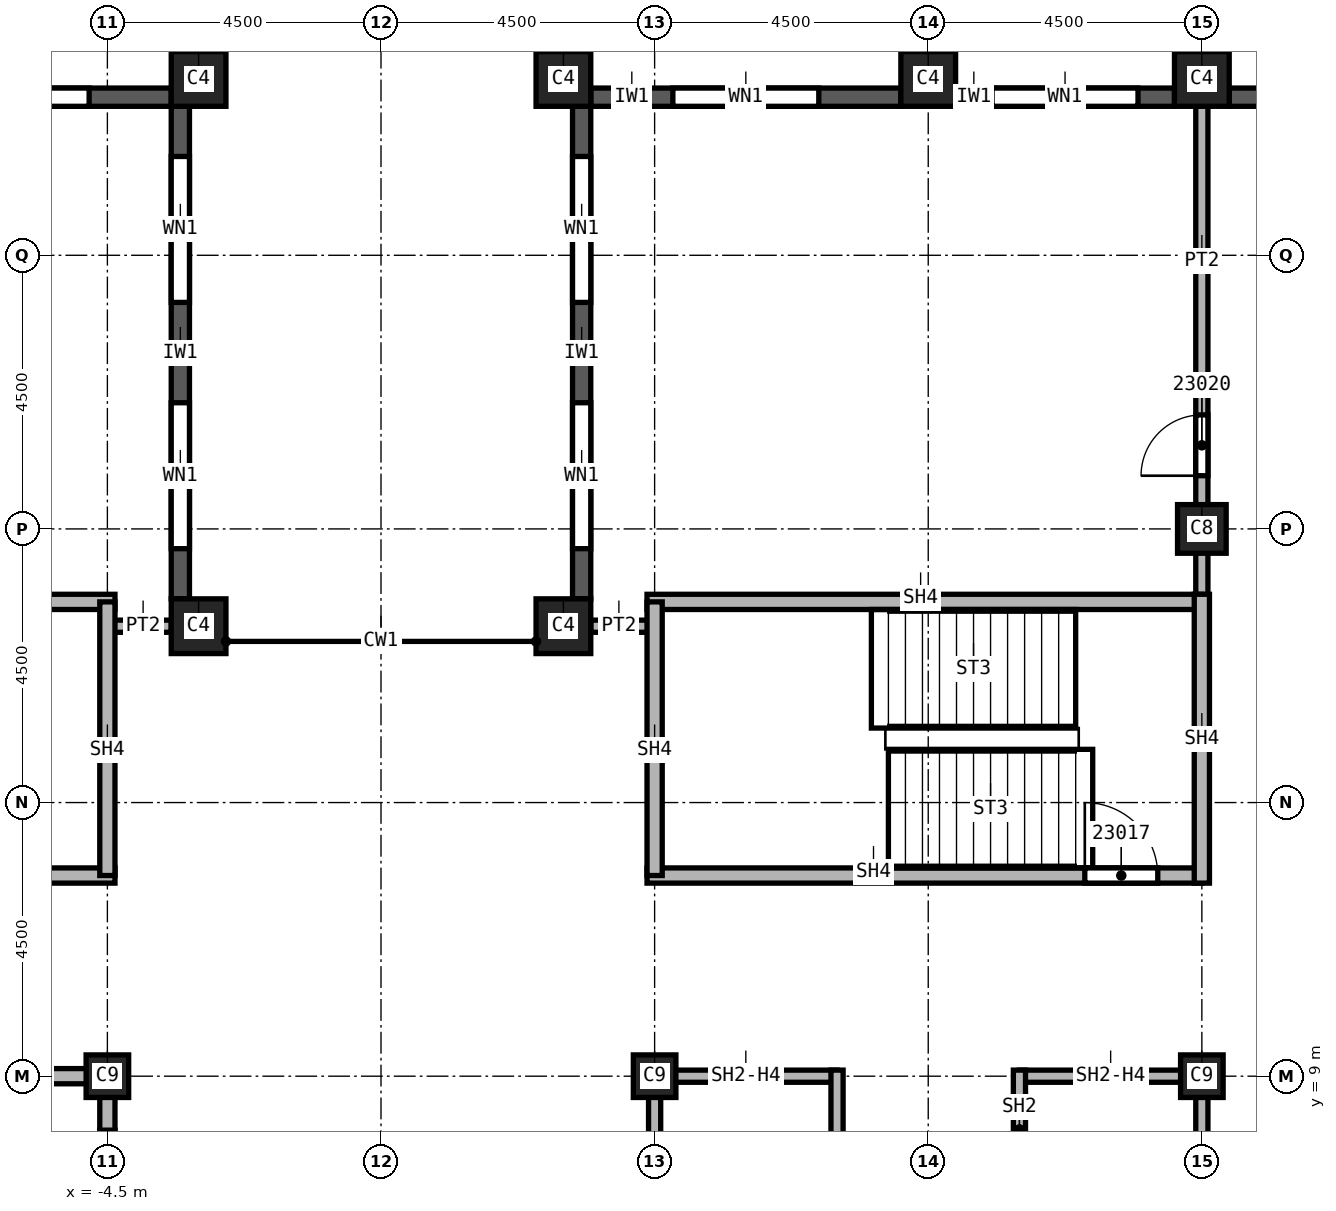
"""IFC4 building model, lengths in metres.
Left out: names, types, materials, properties, quantities, classifications, styles, units other than length and angle.
Written with IfcOpenShell. Run it as: python <this file> out.ifc"""

import sys

from ifc_helpers import new_model, si_unit, direction, frame, frame_2d, origin, origin_2d, place, context, subcontext, project, spatial, rectangle, extrude, element, fill, save


model = new_model("IFC4")
c1 = context("Model", 3, precision=1e-05, world=origin(), true_north=direction((0.0, 1.0)))
c2 = subcontext(c1, "Body", "Model", "MODEL_VIEW")
j1 = project(units=[si_unit("LENGTHUNIT", "METRE"), si_unit("PLANEANGLEUNIT", "RADIAN")], contexts=[c1])
p1 = place(None, origin())
s1 = spatial("IfcSite", under=j1, at=p1, CompositionType="ELEMENT")
p2 = place(p1, origin())
s2 = spatial("IfcBuilding", under=s1, at=p2, CompositionType="ELEMENT")
p3 = place(p2, frame((0.0, 0.0, 330.0)))
s3 = spatial("IfcBuildingStorey", under=s2, at=p3, CompositionType="ELEMENT", Elevation=330.0)
p4 = place(p3, frame((13.5, 18.0, 0.0), z_axis=(0.0, 0.0, 1.0), x_axis=(1.0, 0.0, 0.0)))
e1 = element("IfcColumn", 1, at=p4, inside=s3, PredefinedType="COLUMN", context=c2, shape_type="SweptSolid", body=[
    extrude(rectangle(XDim=0.8, YDim=0.8, at=origin_2d()), origin(), (0.0, 0.0, 1.0), 3.74),
])
for number, where, z_axis, x_axis in (
    (2, (4.5, 9.0, 0.0), (0.0, 0.0, 1.0), (1.0, 0.0, 0.0)),
    (3, (13.5, 9.0, 0.0), (0.0, 0.0, 1.0), (1.0, 0.0, 0.0)),
    (4, (-4.5, 9.0, 0.0), (0.0, 0.0, 1.0), (1.0, 0.0, 0.0)),
):
    element("IfcColumn", number, at=place(p3, frame(where, z_axis=z_axis, x_axis=x_axis)), inside=s3, PredefinedType="COLUMN", context=c2, shape_type="SweptSolid", body=[
        extrude(rectangle(XDim=0.7, YDim=0.7, at=origin_2d()), origin(), (0.0, 0.0, 1.0), 3.74),
    ])
for number, where, z_axis, x_axis in (
    (5, (3.0, 25.4, 0.0), (0.0, 0.0, 1.0), (1.0, 0.0, 0.0)),
    (6, (9.0, 25.4, 0.0), (0.0, 0.0, 1.0), (1.0, 0.0, 0.0)),
    (7, (13.5, 25.4, 0.0), (0.0, 0.0, 1.0), (1.0, 0.0, 0.0)),
    (8, (-3.0, 25.4, 0.0), (0.0, 0.0, 1.0), (1.0, 0.0, 0.0)),
    (9, (3.0, 16.4, 0.0), (0.0, 0.0, 1.0), (1.0, 0.0, 0.0)),
    (10, (-3.0, 16.4, 0.0), (0.0, 0.0, 1.0), (1.0, 0.0, 0.0)),
):
    element("IfcColumn", number, at=place(p3, frame(where, z_axis=z_axis, x_axis=x_axis)), inside=s3, PredefinedType="COLUMN", context=c2, shape_type="SweptSolid", body=[
        extrude(rectangle(XDim=0.9, YDim=0.9, at=origin_2d()), origin(), (0.0, 0.0, 1.0), 3.74),
    ])
p5 = place(p3, frame((17.55, 25.1, 0.0), z_axis=(0.0, 0.0, 1.0), x_axis=(-1.0, 0.0, 0.0)))
e11 = element("IfcWall", 11, at=p5, inside=s3, PredefinedType="SOLIDWALL", context=c2, shape_type="SweptSolid", body=[
    extrude(rectangle(XDim=3.6, YDim=0.3, at=frame_2d((1.8, 0.0))), origin(), (0.0, 0.0, 1.0), 3.14),
])
p6 = place(p5, frame((0.775, 0.0, 0.8)))
e12 = element("IfcOpeningElement", 12, at=p6, cuts=e11, PredefinedType="OPENING", context=c2, shape_type="SweptSolid", body=[
    extrude(rectangle(XDim=1.0, YDim=1.95, at=frame_2d((0.5, 0.975))), frame((0.0, 0.15, 0.0), z_axis=(0.0, -1.0, 0.0), x_axis=(1.0, 0.0, 0.0)), (0.0, 0.0, 1.0), 0.3),
])
p7 = place(p5, frame((2.375, 0.0, 0.8)))
e13 = element("IfcOpeningElement", 13, at=p7, cuts=e11, PredefinedType="OPENING", context=c2, shape_type="SweptSolid", body=[
    extrude(rectangle(XDim=0.6, YDim=1.95, at=frame_2d((0.3, 0.975))), frame((0.0, 0.15, 0.0), z_axis=(0.0, -1.0, 0.0), x_axis=(1.0, 0.0, 0.0)), (0.0, 0.0, 1.0), 0.3),
])
p8 = place(p3, frame((13.05, 25.1, 0.0), z_axis=(0.0, 0.0, 1.0), x_axis=(-1.0, 0.0, 0.0)))
e14 = element("IfcWall", 14, at=p8, inside=s3, PredefinedType="SOLIDWALL", context=c2, shape_type="SweptSolid", body=[
    extrude(rectangle(XDim=3.6, YDim=0.3, at=frame_2d((1.8, 0.0))), origin(), (0.0, 0.0, 1.0), 3.14),
])
p9 = place(p8, frame((0.6, 0.0, 0.8)))
e15 = element("IfcOpeningElement", 15, at=p9, cuts=e14, PredefinedType="OPENING", context=c2, shape_type="SweptSolid", body=[
    extrude(rectangle(XDim=2.4, YDim=1.95, at=frame_2d((1.2, 0.975))), frame((0.0, 0.15, 0.0), z_axis=(0.0, -1.0, 0.0), x_axis=(1.0, 0.0, 0.0)), (0.0, 0.0, 1.0), 0.3),
])
p10 = place(p3, frame((8.55, 25.1, 0.0), z_axis=(0.0, 0.0, 1.0), x_axis=(-1.0, 0.0, 0.0)))
e16 = element("IfcWall", 16, at=p10, inside=s3, PredefinedType="SOLIDWALL", context=c2, shape_type="SweptSolid", body=[
    extrude(rectangle(XDim=5.1, YDim=0.3, at=frame_2d((2.55, 0.0))), origin(), (0.0, 0.0, 1.0), 3.14),
])
p11 = place(p10, frame((1.35, 0.0, 0.8)))
e17 = element("IfcOpeningElement", 17, at=p11, cuts=e16, PredefinedType="OPENING", context=c2, shape_type="SweptSolid", body=[
    extrude(rectangle(XDim=2.4, YDim=1.95, at=frame_2d((1.2, 0.975))), frame((0.0, 0.15, 0.0), z_axis=(0.0, -1.0, 0.0), x_axis=(1.0, 0.0, 0.0)), (0.0, 0.0, 1.0), 0.3),
])
p12 = place(p3, frame((3.3, 24.95, 0.0), z_axis=(0.0, 0.0, 1.0), x_axis=(0.0, -1.0, 0.0)))
e18 = element("IfcWall", 18, at=p12, inside=s3, PredefinedType="SOLIDWALL", context=c2, shape_type="SweptSolid", body=[
    extrude(rectangle(XDim=8.1, YDim=0.3, at=frame_2d((4.05, 0.0))), origin(), (0.0, 0.0, 1.0), 3.14),
])
p13 = place(p12, frame((0.825, 0.0, 0.8)))
e19 = element("IfcOpeningElement", 19, at=p13, cuts=e18, PredefinedType="OPENING", context=c2, shape_type="SweptSolid", body=[
    extrude(rectangle(XDim=2.4, YDim=1.95, at=frame_2d((1.2, 0.975))), frame((0.0, 0.15, 0.0), z_axis=(0.0, -1.0, 0.0), x_axis=(1.0, 0.0, 0.0)), (0.0, 0.0, 1.0), 0.3),
])
p14 = place(p12, frame((4.875, 0.0, 0.8)))
e20 = element("IfcOpeningElement", 20, at=p14, cuts=e18, PredefinedType="OPENING", context=c2, shape_type="SweptSolid", body=[
    extrude(rectangle(XDim=2.4, YDim=1.95, at=frame_2d((1.2, 0.975))), frame((0.0, 0.15, 0.0), z_axis=(0.0, -1.0, 0.0), x_axis=(1.0, 0.0, 0.0)), (0.0, 0.0, 1.0), 0.3),
])
p15 = place(p3, frame((-3.3, 16.85, 0.0), z_axis=(0.0, 0.0, 1.0), x_axis=(0.0, 1.0, 0.0)))
e21 = element("IfcWall", 21, at=p15, inside=s3, PredefinedType="SOLIDWALL", context=c2, shape_type="SweptSolid", body=[
    extrude(rectangle(XDim=8.1, YDim=0.3, at=frame_2d((4.05, 0.0))), origin(), (0.0, 0.0, 1.0), 3.14),
])
p16 = place(p15, frame((0.825, 0.0, 0.8)))
e22 = element("IfcOpeningElement", 22, at=p16, cuts=e21, PredefinedType="OPENING", context=c2, shape_type="SweptSolid", body=[
    extrude(rectangle(XDim=2.4, YDim=1.95, at=frame_2d((1.2, 0.975))), frame((0.0, 0.15, 0.0), z_axis=(0.0, -1.0, 0.0), x_axis=(1.0, 0.0, 0.0)), (0.0, 0.0, 1.0), 0.3),
])
p17 = place(p15, frame((4.875, 0.0, 0.8)))
e23 = element("IfcOpeningElement", 23, at=p17, cuts=e21, PredefinedType="OPENING", context=c2, shape_type="SweptSolid", body=[
    extrude(rectangle(XDim=2.4, YDim=1.95, at=frame_2d((1.2, 0.975))), frame((0.0, 0.15, 0.0), z_axis=(0.0, -1.0, 0.0), x_axis=(1.0, 0.0, 0.0)), (0.0, 0.0, 1.0), 0.3),
])
p18 = place(p3, frame((-3.45, 25.1, 0.0), z_axis=(0.0, 0.0, 1.0), x_axis=(-1.0, 0.0, 0.0)))
e24 = element("IfcWall", 24, at=p18, inside=s3, PredefinedType="SOLIDWALL", context=c2, shape_type="SweptSolid", body=[
    extrude(rectangle(XDim=5.1, YDim=0.3, at=frame_2d((2.55, 0.0))), origin(), (0.0, 0.0, 1.0), 3.14),
])
p19 = place(p18, frame((1.35, 0.0, 0.8)))
e25 = element("IfcOpeningElement", 25, at=p19, cuts=e24, PredefinedType="OPENING", context=c2, shape_type="SweptSolid", body=[
    extrude(rectangle(XDim=2.4, YDim=1.95, at=frame_2d((1.2, 0.975))), frame((0.0, 0.15, 0.0), z_axis=(0.0, -1.0, 0.0), x_axis=(1.0, 0.0, 0.0)), (0.0, 0.0, 1.0), 0.3),
])
for number, where, z_axis, x_axis in (
    (26, (-4.5, 16.4, 0.0), (0.0, 0.0, 1.0), (1.0, 0.0, 0.0)),
    (27, (3.45, 16.4, 0.0), (0.0, 0.0, 1.0), (1.0, 0.0, 0.0)),
):
    element("IfcWall", number, at=place(p3, frame(where, z_axis=z_axis, x_axis=x_axis)), inside=s3, PredefinedType="PARTITIONING", context=c2, shape_type="SweptSolid", body=[
        extrude(rectangle(XDim=1.05, YDim=0.2, at=frame_2d((0.525, 0.0))), origin(), (0.0, 0.0, 1.0), 3.74),
    ])
p20 = place(p3, frame((13.5, 16.675, 0.0), z_axis=(0.0, 0.0, 1.0), x_axis=(0.0, 1.0, 0.0)))
e28 = element("IfcWall", 28, at=p20, inside=s3, PredefinedType="PARTITIONING", context=c2, shape_type="SweptSolid", body=[
    extrude(rectangle(XDim=8.275, YDim=0.2, at=frame_2d((4.137, 0.0))), origin(), (0.0, 0.0, 1.0), 3.74),
])
p21 = place(p20, frame((2.2, 0.0, 0.0)))
e29 = element("IfcOpeningElement", 29, at=p21, cuts=e28, PredefinedType="OPENING", context=c2, shape_type="SweptSolid", body=[
    extrude(rectangle(XDim=1.0, YDim=2.1, at=frame_2d((0.5, 1.05))), frame((0.0, 0.1, 0.0), z_axis=(0.0, -1.0, 0.0), x_axis=(1.0, 0.0, 0.0)), (0.0, 0.0, 1.0), 0.2),
])
p22 = place(p3, frame((4.5, -6.0, 0.0), z_axis=(0.0, 0.0, 1.0), x_axis=(0.0, 1.0, 0.0)))
e30 = element("IfcWall", 30, at=p22, inside=s3, PredefinedType="SOLIDWALL", context=c2, shape_type="SweptSolid", body=[
    extrude(rectangle(XDim=15.1, YDim=0.2, at=frame_2d((7.55, 0.0))), origin(), (0.0, 0.0, 1.0), 3.062),
])
p23 = place(p22, frame((0.25, 0.0, 0.0)))
e31 = element("IfcOpeningElement", 31, at=p23, cuts=e30, PredefinedType="OPENING", context=c2, shape_type="SweptSolid", body=[
    extrude(rectangle(XDim=1.1, YDim=2.1, at=frame_2d((0.55, 1.05))), frame((0.0, 0.1, 0.0), z_axis=(0.0, -1.0, 0.0), x_axis=(1.0, 0.0, 0.0)), (0.0, 0.0, 1.0), 0.2),
])
p24 = place(p22, frame((6.85, 0.0, 0.0)))
e32 = element("IfcOpeningElement", 32, at=p24, cuts=e30, PredefinedType="OPENING", context=c2, shape_type="SweptSolid", body=[
    extrude(rectangle(XDim=1.1, YDim=2.1, at=frame_2d((0.55, 1.05))), frame((0.0, 0.1, 0.0), z_axis=(0.0, -1.0, 0.0), x_axis=(1.0, 0.0, 0.0)), (0.0, 0.0, 1.0), 0.2),
])
p25 = place(p3, frame((4.5, 9.0, 0.0), z_axis=(0.0, 0.0, 1.0), x_axis=(1.0, 0.0, 0.0)))
e33 = element("IfcWall", 33, at=p25, inside=s3, PredefinedType="SOLIDWALL", context=c2, shape_type="SweptSolid", body=[
    extrude(rectangle(XDim=3.0, YDim=0.2, at=frame_2d((1.5, 0.0))), origin(), (0.0, 0.0, 1.0), 3.062),
])
p26 = place(p3, frame((7.5, 9.1, 0.0), z_axis=(0.0, 0.0, 1.0), x_axis=(0.0, -1.0, 0.0)))
e34 = element("IfcWall", 34, at=p26, inside=s3, PredefinedType="SOLIDWALL", context=c2, shape_type="SweptSolid", body=[
    extrude(rectangle(XDim=6.225, YDim=0.2, at=frame_2d((3.113, 0.0))), origin(), (0.0, 0.0, 1.0), 3.74),
])
p27 = place(p3, frame((10.5, 9.0, 0.0), z_axis=(0.0, 0.0, 1.0), x_axis=(1.0, 0.0, 0.0)))
e35 = element("IfcWall", 35, at=p27, inside=s3, PredefinedType="SOLIDWALL", context=c2, shape_type="SweptSolid", body=[
    extrude(rectangle(XDim=3.0, YDim=0.2, at=frame_2d((1.5, 0.0))), origin(), (0.0, 0.0, 1.0), 3.062),
])
p28 = place(p3, frame((10.5, 9.1, 0.0), z_axis=(0.0, 0.0, 1.0), x_axis=(0.0, -1.0, 0.0)))
e36 = element("IfcWall", 36, at=p28, inside=s3, PredefinedType="SOLIDWALL", context=c2, shape_type="SweptSolid", body=[
    extrude(rectangle(XDim=3.225, YDim=0.2, at=frame_2d((1.613, 0.0))), origin(), (0.0, 0.0, 1.0), 3.74),
])
p29 = place(p28, frame((1.75, 0.0, 0.0)))
e37 = element("IfcOpeningElement", 37, at=p29, cuts=e36, PredefinedType="OPENING", context=c2, shape_type="SweptSolid", body=[
    extrude(rectangle(XDim=1.1, YDim=2.1, at=frame_2d((0.55, 1.05))), frame((0.0, 0.1, 0.0), z_axis=(0.0, -1.0, 0.0), x_axis=(1.0, 0.0, 0.0)), (0.0, 0.0, 1.0), 0.2),
])
p30 = place(p3, frame((13.5, 9.1, 0.0), z_axis=(0.0, 0.0, 1.0), x_axis=(0.0, -1.0, 0.0)))
e38 = element("IfcWall", 38, at=p30, inside=s3, PredefinedType="SOLIDWALL", context=c2, shape_type="SweptSolid", body=[
    extrude(rectangle(XDim=3.1, YDim=0.2, at=frame_2d((1.55, 0.0))), origin(), (0.0, 0.0, 1.0), 3.062),
])
p31 = place(p3, frame((-7.5, 9.0, 0.0), z_axis=(0.0, 0.0, 1.0), x_axis=(1.0, 0.0, 0.0)))
e39 = element("IfcWall", 39, at=p31, inside=s3, PredefinedType="SOLIDWALL", context=c2, shape_type="SweptSolid", body=[
    extrude(rectangle(XDim=3.0, YDim=0.25, at=frame_2d((1.5, 0.0))), origin(), (0.0, 0.0, 1.0), 3.062),
])
p32 = place(p3, frame((-4.5, 9.125, 0.0), z_axis=(0.0, 0.0, 1.0), x_axis=(0.0, -1.0, 0.0)))
e40 = element("IfcWall", 40, at=p32, inside=s3, PredefinedType="SOLIDWALL", context=c2, shape_type="SweptSolid", body=[
    extrude(rectangle(XDim=3.125, YDim=0.25, at=frame_2d((1.562, 0.0))), origin(), (0.0, 0.0, 1.0), 3.062),
])
p33 = place(p32, frame((1.012, 0.0, 0.0)))
e41 = element("IfcOpeningElement", 41, at=p33, cuts=e40, PredefinedType="OPENING", context=c2, shape_type="SweptSolid", body=[
    extrude(rectangle(XDim=1.1, YDim=2.1, at=frame_2d((0.55, 1.05))), frame((0.0, 0.125, 0.0), z_axis=(0.0, -1.0, 0.0), x_axis=(1.0, 0.0, 0.0)), (0.0, 0.0, 1.0), 0.25),
])
p34 = place(p3, frame((-13.5, 12.3, 0.0), z_axis=(0.0, 0.0, 1.0), x_axis=(1.0, 0.0, 0.0)))
e42 = element("IfcWall", 42, at=p34, inside=s3, PredefinedType="SOLIDWALL", context=c2, shape_type="SweptSolid", body=[
    extrude(rectangle(XDim=9.125, YDim=0.25, at=frame_2d((4.562, 0.0))), origin(), (0.0, 0.0, 1.0), 3.74),
])
p35 = place(p34, frame((0.6, 0.0, 0.0)))
e43 = element("IfcOpeningElement", 43, at=p35, cuts=e42, PredefinedType="OPENING", context=c2, shape_type="SweptSolid", body=[
    extrude(rectangle(XDim=1.2, YDim=2.1, at=frame_2d((0.6, 1.05))), frame((0.0, 0.125, 0.0), z_axis=(0.0, -1.0, 0.0), x_axis=(1.0, 0.0, 0.0)), (0.0, 0.0, 1.0), 0.25),
])
p36 = place(p3, frame((-13.5, 16.8, 0.0), z_axis=(0.0, 0.0, 1.0), x_axis=(1.0, 0.0, 0.0)))
e44 = element("IfcWall", 44, at=p36, inside=s3, PredefinedType="SOLIDWALL", context=c2, shape_type="SweptSolid", body=[
    extrude(rectangle(XDim=9.125, YDim=0.25, at=frame_2d((4.562, 0.0))), origin(), (0.0, 0.0, 1.0), 3.74),
])
p37 = place(p3, frame((-4.5, 16.8, 0.0), z_axis=(0.0, 0.0, 1.0), x_axis=(0.0, -1.0, 0.0)))
e45 = element("IfcWall", 45, at=p37, inside=s3, PredefinedType="SOLIDWALL", context=c2, shape_type="SweptSolid", body=[
    extrude(rectangle(XDim=4.5, YDim=0.25, at=frame_2d((2.25, 0.0))), origin(), (0.0, 0.0, 1.0), 3.74),
])
p38 = place(p3, frame((4.375, 12.3, 0.0), z_axis=(0.0, 0.0, 1.0), x_axis=(1.0, 0.0, 0.0)))
e46 = element("IfcWall", 46, at=p38, inside=s3, PredefinedType="SOLIDWALL", context=c2, shape_type="SweptSolid", body=[
    extrude(rectangle(XDim=9.125, YDim=0.25, at=frame_2d((4.562, 0.0))), origin(), (0.0, 0.0, 1.0), 3.74),
])
p39 = place(p38, frame((7.2, 0.0, 0.0)))
e47 = element("IfcOpeningElement", 47, at=p39, cuts=e46, PredefinedType="OPENING", context=c2, shape_type="SweptSolid", body=[
    extrude(rectangle(XDim=1.2, YDim=2.1, at=frame_2d((0.6, 1.05))), frame((0.0, 0.125, 0.0), z_axis=(0.0, -1.0, 0.0), x_axis=(1.0, 0.0, 0.0)), (0.0, 0.0, 1.0), 0.25),
])
p40 = place(p3, frame((4.375, 16.8, 0.0), z_axis=(0.0, 0.0, 1.0), x_axis=(1.0, 0.0, 0.0)))
e48 = element("IfcWall", 48, at=p40, inside=s3, PredefinedType="SOLIDWALL", context=c2, shape_type="SweptSolid", body=[
    extrude(rectangle(XDim=9.125, YDim=0.25, at=frame_2d((4.562, 0.0))), origin(), (0.0, 0.0, 1.0), 3.74),
])
p41 = place(p3, frame((4.5, 12.3, 0.0), z_axis=(0.0, 0.0, 1.0), x_axis=(0.0, 1.0, 0.0)))
e49 = element("IfcWall", 49, at=p41, inside=s3, PredefinedType="SOLIDWALL", context=c2, shape_type="SweptSolid", body=[
    extrude(rectangle(XDim=4.5, YDim=0.25, at=frame_2d((2.25, 0.0))), origin(), (0.0, 0.0, 1.0), 3.74),
])
p42 = place(p3, frame((13.5, 12.175, 0.0), z_axis=(0.0, 0.0, 1.0), x_axis=(0.0, 1.0, 0.0)))
e50 = element("IfcWall", 50, at=p42, inside=s3, PredefinedType="SOLIDWALL", context=c2, shape_type="SweptSolid", body=[
    extrude(rectangle(XDim=4.75, YDim=0.25, at=frame_2d((2.375, 0.0))), origin(), (0.0, 0.0, 1.0), 3.74),
])
p43 = place(p9, origin())
e51 = element("IfcWindow", 51, at=p43, inside=s3, PartitioningType="SINGLE_PANEL", PredefinedType="WINDOW", context=c2, shape_type="SweptSolid", body=[
    extrude(rectangle(XDim=2.4, YDim=1.95, at=frame_2d((1.2, 0.975))), frame((0.0, 0.03, 0.0), z_axis=(0.0, -1.0, 0.0), x_axis=(1.0, 0.0, 0.0)), (0.0, 0.0, 1.0), 0.06),
])
fill(e15, e51)
p44 = place(p11, origin())
e52 = element("IfcWindow", 52, at=p44, inside=s3, PartitioningType="SINGLE_PANEL", PredefinedType="WINDOW", context=c2, shape_type="SweptSolid", body=[
    extrude(rectangle(XDim=2.4, YDim=1.95, at=frame_2d((1.2, 0.975))), frame((0.0, 0.03, 0.0), z_axis=(0.0, -1.0, 0.0), x_axis=(1.0, 0.0, 0.0)), (0.0, 0.0, 1.0), 0.06),
])
fill(e17, e52)
p45 = place(p13, origin())
e53 = element("IfcWindow", 53, at=p45, inside=s3, PartitioningType="SINGLE_PANEL", PredefinedType="WINDOW", context=c2, shape_type="SweptSolid", body=[
    extrude(rectangle(XDim=2.4, YDim=1.95, at=frame_2d((1.2, 0.975))), frame((0.0, 0.03, 0.0), z_axis=(0.0, -1.0, 0.0), x_axis=(1.0, 0.0, 0.0)), (0.0, 0.0, 1.0), 0.06),
])
fill(e19, e53)
p46 = place(p14, origin())
e54 = element("IfcWindow", 54, at=p46, inside=s3, PartitioningType="SINGLE_PANEL", PredefinedType="WINDOW", context=c2, shape_type="SweptSolid", body=[
    extrude(rectangle(XDim=2.4, YDim=1.95, at=frame_2d((1.2, 0.975))), frame((0.0, 0.03, 0.0), z_axis=(0.0, -1.0, 0.0), x_axis=(1.0, 0.0, 0.0)), (0.0, 0.0, 1.0), 0.06),
])
fill(e20, e54)
p47 = place(p16, origin())
e55 = element("IfcWindow", 55, at=p47, inside=s3, PartitioningType="SINGLE_PANEL", PredefinedType="WINDOW", context=c2, shape_type="SweptSolid", body=[
    extrude(rectangle(XDim=2.4, YDim=1.95, at=frame_2d((1.2, 0.975))), frame((0.0, 0.03, 0.0), z_axis=(0.0, -1.0, 0.0), x_axis=(1.0, 0.0, 0.0)), (0.0, 0.0, 1.0), 0.06),
])
fill(e22, e55)
p48 = place(p17, origin())
e56 = element("IfcWindow", 56, at=p48, inside=s3, PartitioningType="SINGLE_PANEL", PredefinedType="WINDOW", context=c2, shape_type="SweptSolid", body=[
    extrude(rectangle(XDim=2.4, YDim=1.95, at=frame_2d((1.2, 0.975))), frame((0.0, 0.03, 0.0), z_axis=(0.0, -1.0, 0.0), x_axis=(1.0, 0.0, 0.0)), (0.0, 0.0, 1.0), 0.06),
])
fill(e23, e56)
p49 = place(p19, origin())
e57 = element("IfcWindow", 57, at=p49, inside=s3, PartitioningType="SINGLE_PANEL", PredefinedType="WINDOW", context=c2, shape_type="SweptSolid", body=[
    extrude(rectangle(XDim=2.4, YDim=1.95, at=frame_2d((1.2, 0.975))), frame((0.0, 0.03, 0.0), z_axis=(0.0, -1.0, 0.0), x_axis=(1.0, 0.0, 0.0)), (0.0, 0.0, 1.0), 0.06),
])
fill(e25, e57)
p50 = place(p39, origin())
e58 = element("IfcDoor", 58, at=p50, inside=s3, OperationType="SINGLE_SWING_RIGHT", PredefinedType="DOOR", context=c2, shape_type="SweptSolid", body=[
    extrude(rectangle(XDim=1.2, YDim=2.1, at=frame_2d((0.6, 1.05))), frame((0.0, 0.025, 0.0), z_axis=(0.0, -1.0, 0.0), x_axis=(1.0, 0.0, 0.0)), (0.0, 0.0, 1.0), 0.05),
])
fill(e47, e58)
p51 = place(p21, origin())
e59 = element("IfcDoor", 59, at=p51, inside=s3, OperationType="SINGLE_SWING_LEFT", PredefinedType="DOOR", context=c2, shape_type="SweptSolid", body=[
    extrude(rectangle(XDim=1.0, YDim=2.1, at=frame_2d((0.5, 1.05))), frame((0.0, 0.025, 0.0), z_axis=(0.0, -1.0, 0.0), x_axis=(1.0, 0.0, 0.0)), (0.0, 0.0, 1.0), 0.05),
])
fill(e29, e59)
p52 = place(p33, origin())
e60 = element("IfcDoor", 60, at=p52, inside=s3, OperationType="SLIDING_TO_LEFT", PredefinedType="DOOR", context=c2, shape_type="SweptSolid", body=[
    extrude(rectangle(XDim=1.1, YDim=2.1, at=frame_2d((0.55, 1.05))), frame((0.0, 0.025, 0.0), z_axis=(0.0, -1.0, 0.0), x_axis=(1.0, 0.0, 0.0)), (0.0, 0.0, 1.0), 0.05),
])
fill(e41, e60)
save(model, sys.argv[1])
